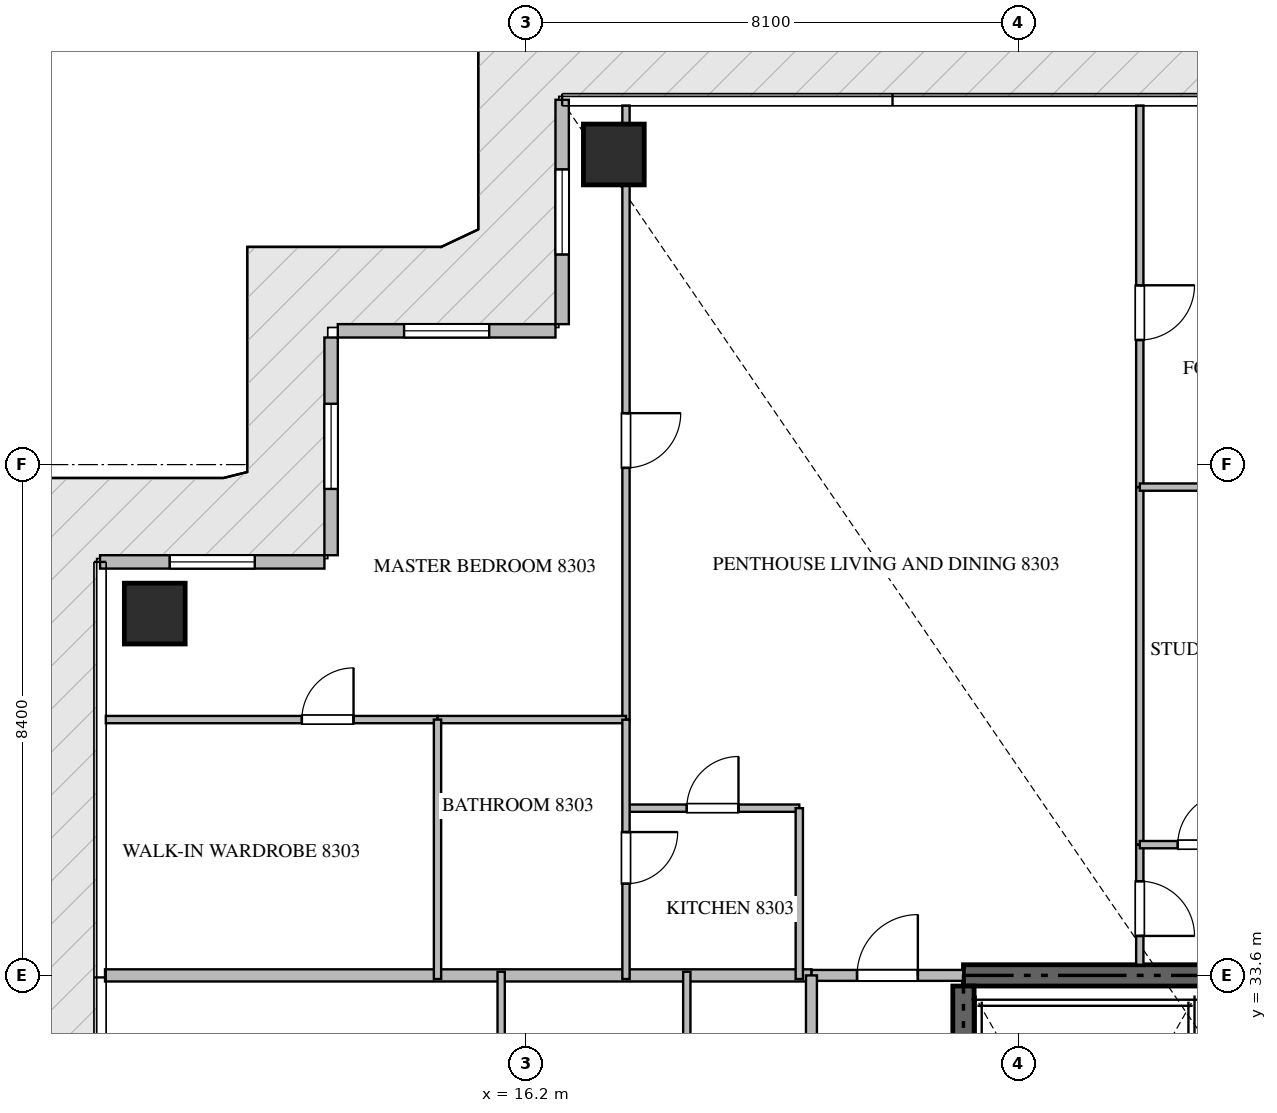
"""IFC4 building model, lengths in metres.
Left out: names, types, materials, properties, quantities, classifications, styles, units other than length and angle.
Written with IfcOpenShell. Run it as: python <this file> out.ifc"""

import sys

from ifc_helpers import new_model, si_unit, direction, frame, frame_2d, origin, origin_2d, place, context, subcontext, project, spatial, rectangle, extrude, source, transform, mapped, element, fill, save


model = new_model("IFC4")
c1 = context("Model", 3, precision=1e-05, world=origin(), true_north=direction((0.0, 1.0)))
c2 = subcontext(c1, "Body", "Model", "MODEL_VIEW")
j1 = project(units=[si_unit("LENGTHUNIT", "METRE"), si_unit("PLANEANGLEUNIT", "RADIAN")], contexts=[c1])
p1 = place(None, origin())
s1 = spatial("IfcSite", under=j1, at=p1, CompositionType="ELEMENT")
p2 = place(p1, origin())
s2 = spatial("IfcBuilding", under=s1, at=p2, CompositionType="ELEMENT")
p3 = place(p2, frame((0.0, 0.0, 333.95)))
s3 = spatial("IfcBuildingStorey", under=s2, at=p3, CompositionType="ELEMENT", Elevation=333.95)
p4 = place(p3, frame((41.4, 33.6, -0.26), z_axis=(0.0, 0.0, 1.0), x_axis=(-1.0, 0.0, 0.0)))
e1 = element("IfcWall", 1, at=p4, inside=s3, PredefinedType="SHEAR", context=c2, shape_type="SweptSolid", body=[
    extrude(rectangle(XDim=18.0, YDim=0.35, at=frame_2d((9.0, 0.0))), origin(), (0.0, 0.0, 1.0), 3.868),
])
p5 = place(p3, frame((23.4, 24.25, -0.26), z_axis=(0.0, 0.0, 1.0), x_axis=(0.0, 1.0, 0.0)))
e2 = element("IfcWall", 2, at=p5, inside=s3, PredefinedType="SHEAR", context=c2, shape_type="SweptSolid", body=[
    extrude(rectangle(XDim=9.175, YDim=0.35, at=frame_2d((4.587, 0.0))), origin(), (0.0, 0.0, 1.0), 3.868),
])
m1 = source(origin(), c2, "Body", "SweptSolid", [
    extrude(rectangle(XDim=1.0, YDim=1.0, at=origin_2d()), origin(), (0.0, 0.0, 1.0), 3.87),
])
for number, where, z_axis, x_axis in (
    (3, (17.65, 47.1, -0.26), (0.0, 0.0, 1.0), (1.0, 0.0, 0.0)),
    (4, (10.1, 39.55, -0.26), (0.0, 0.0, 1.0), (1.0, 0.0, 0.0)),
):
    element("IfcColumn", number, at=place(p3, frame(where, z_axis=z_axis, x_axis=x_axis)), inside=s3, PredefinedType="COLUMN", context=c2, shape_type="MappedRepresentation", body=[
        mapped(m1, transform((0.0, 0.0, 0.0), scale=1.0)),
    ])
p6 = place(p3, frame((16.8, 48.0, 0.0), z_axis=(0.0, 0.0, 1.0), x_axis=(0.0, -1.0, 0.0)))
e5 = element("IfcWall", 5, at=p6, inside=s3, PredefinedType="ELEMENTEDWALL", context=c2, shape_type="SweptSolid", body=[
    extrude(rectangle(XDim=3.69, YDim=0.22, at=frame_2d((1.845, 0.0))), origin(), (0.0, 0.0, 1.0), 3.595),
])
p7 = place(p6, frame((1.145, 0.0, 0.65)))
e6 = element("IfcOpeningElement", 6, at=p7, cuts=e5, PredefinedType="OPENING", context=c2, shape_type="SweptSolid", body=[
    extrude(rectangle(XDim=1.4, YDim=1.35, at=frame_2d((0.7, 0.675))), frame((0.0, 0.12, 0.0), z_axis=(0.0, -1.0, 0.0), x_axis=(1.0, 0.0, 0.0)), (0.0, 0.0, 1.0), 0.24),
])
p8 = place(p3, frame((16.69, 44.2, 0.0), z_axis=(0.0, 0.0, 1.0), x_axis=(-1.0, 0.0, 0.0)))
e7 = element("IfcWall", 7, at=p8, inside=s3, PredefinedType="ELEMENTEDWALL", context=c2, shape_type="SweptSolid", body=[
    extrude(rectangle(XDim=3.58, YDim=0.22, at=frame_2d((1.79, 0.0))), origin(), (0.0, 0.0, 1.0), 3.595),
])
p9 = place(p8, frame((1.09, 0.0, 0.65)))
e8 = element("IfcOpeningElement", 8, at=p9, cuts=e7, PredefinedType="OPENING", context=c2, shape_type="SweptSolid", body=[
    extrude(rectangle(XDim=1.4, YDim=1.35, at=frame_2d((0.7, 0.675))), frame((0.0, 0.12, 0.0), z_axis=(0.0, -1.0, 0.0), x_axis=(1.0, 0.0, 0.0)), (0.0, 0.0, 1.0), 0.24),
])
p10 = place(p3, frame((13.0, 44.09, 0.0), z_axis=(0.0, 0.0, 1.0), x_axis=(0.0, -1.0, 0.0)))
e9 = element("IfcWall", 9, at=p10, inside=s3, PredefinedType="ELEMENTEDWALL", context=c2, shape_type="SweptSolid", body=[
    extrude(rectangle(XDim=3.58, YDim=0.22, at=frame_2d((1.79, 0.0))), origin(), (0.0, 0.0, 1.0), 3.595),
])
p11 = place(p10, frame((1.09, 0.0, 0.65)))
e10 = element("IfcOpeningElement", 10, at=p11, cuts=e9, PredefinedType="OPENING", context=c2, shape_type="SweptSolid", body=[
    extrude(rectangle(XDim=1.4, YDim=1.35, at=frame_2d((0.7, 0.675))), frame((0.0, 0.12, 0.0), z_axis=(0.0, -1.0, 0.0), x_axis=(1.0, 0.0, 0.0)), (0.0, 0.0, 1.0), 0.24),
])
p12 = place(p3, frame((12.89, 40.4, 0.0), z_axis=(0.0, 0.0, 1.0), x_axis=(-1.0, 0.0, 0.0)))
e11 = element("IfcWall", 11, at=p12, inside=s3, PredefinedType="ELEMENTEDWALL", context=c2, shape_type="SweptSolid", body=[
    extrude(rectangle(XDim=3.69, YDim=0.22, at=frame_2d((1.845, 0.0))), origin(), (0.0, 0.0, 1.0), 3.595),
])
p13 = place(p12, frame((1.145, 0.0, 0.65)))
e12 = element("IfcOpeningElement", 12, at=p13, cuts=e11, PredefinedType="OPENING", context=c2, shape_type="SweptSolid", body=[
    extrude(rectangle(XDim=1.4, YDim=1.35, at=frame_2d((0.7, 0.675))), frame((0.0, 0.12, 0.0), z_axis=(0.0, -1.0, 0.0), x_axis=(1.0, 0.0, 0.0)), (0.0, 0.0, 1.0), 0.24),
])
p14 = place(p3, frame((9.282, 33.6, 0.0), z_axis=(0.0, 0.0, 1.0), x_axis=(1.0, 0.0, 0.0)))
e13 = element("IfcWall", 13, at=p14, inside=s3, PredefinedType="PARTITIONING", context=c2, shape_type="SweptSolid", body=[
    extrude(rectangle(XDim=11.618, YDim=0.2, at=frame_2d((5.809, 0.0))), origin(), (0.0, 0.0, 1.0), 3.61),
])
p15 = place(p3, frame((20.902, 33.6, 0.0), z_axis=(0.0, 0.0, 1.0), x_axis=(1.0, 0.0, 0.0)))
e14 = element("IfcWall", 14, at=p15, inside=s3, PredefinedType="PARTITIONING", context=c2, shape_type="SweptSolid", body=[
    extrude(rectangle(XDim=2.496, YDim=0.18, at=frame_2d((1.248, 0.0))), origin(), (0.0, 0.0, 1.0), 3.61),
])
p16 = place(p15, frame((0.748, 0.0, 0.0)))
e15 = element("IfcOpeningElement", 15, at=p16, cuts=e14, PredefinedType="OPENING", context=c2, shape_type="SweptSolid", body=[
    extrude(rectangle(XDim=1.0, YDim=2.15, at=frame_2d((0.5, 1.075))), frame((0.0, 0.1, 0.0), z_axis=(0.0, -1.0, 0.0), x_axis=(1.0, 0.0, 0.0)), (0.0, 0.0, 1.0), 0.2),
])
p17 = place(p3, frame((20.9, 16.8, 0.0), z_axis=(0.0, 0.0, 1.0), x_axis=(0.0, 1.0, 0.0)))
e16 = element("IfcWall", 16, at=p17, inside=s3, PredefinedType="PARTITIONING", context=c2, shape_type="SweptSolid", body=[
    extrude(rectangle(XDim=16.8, YDim=0.18, at=frame_2d((8.4, 0.0))), origin(), (0.0, 0.0, 1.0), 3.61),
])
p18 = place(p17, frame((4.503, 0.0, 0.0)))
e17 = element("IfcOpeningElement", 17, at=p18, cuts=e16, PredefinedType="OPENING", context=c2, shape_type="SweptSolid", body=[
    extrude(rectangle(XDim=1.0, YDim=2.15, at=frame_2d((0.5, 1.075))), frame((0.0, 0.1, 0.0), z_axis=(0.0, -1.0, 0.0), x_axis=(1.0, 0.0, 0.0)), (0.0, 0.0, 1.0), 0.2),
])
p19 = place(p17, frame((8.706, 0.0, 0.0)))
e18 = element("IfcOpeningElement", 18, at=p19, cuts=e16, PredefinedType="OPENING", context=c2, shape_type="SweptSolid", body=[
    extrude(rectangle(XDim=1.0, YDim=2.15, at=frame_2d((0.5, 1.075))), frame((0.0, 0.1, 0.0), z_axis=(0.0, -1.0, 0.0), x_axis=(1.0, 0.0, 0.0)), (0.0, 0.0, 1.0), 0.2),
])
p20 = place(p3, frame((17.85, 36.35, 0.0), z_axis=(0.0, 0.0, 1.0), x_axis=(1.0, 0.0, 0.0)))
e19 = element("IfcWall", 19, at=p20, inside=s3, PredefinedType="PARTITIONING", context=c2, shape_type="SweptSolid", body=[
    extrude(rectangle(XDim=2.85, YDim=0.12, at=frame_2d((1.425, 0.0))), origin(), (0.0, 0.0, 1.0), 3.332),
])
p21 = place(p20, frame((1.0, 0.0, 0.0)))
e20 = element("IfcOpeningElement", 20, at=p21, cuts=e19, PredefinedType="OPENING", context=c2, shape_type="SweptSolid", body=[
    extrude(rectangle(XDim=0.85, YDim=2.1, at=frame_2d((0.425, 1.05))), frame((0.0, 0.07, 0.0), z_axis=(0.0, -1.0, 0.0), x_axis=(1.0, 0.0, 0.0)), (0.0, 0.0, 1.0), 0.14),
])
p22 = place(p3, frame((20.7, 36.35, 0.0), z_axis=(0.0, 0.0, 1.0), x_axis=(0.0, -1.0, 0.0)))
e21 = element("IfcWall", 21, at=p22, inside=s3, PredefinedType="PARTITIONING", context=c2, shape_type="SweptSolid", body=[
    extrude(rectangle(XDim=2.81, YDim=0.12, at=frame_2d((1.405, 0.0))), origin(), (0.0, 0.0, 1.0), 3.61),
])
p23 = place(p3, frame((17.85, 47.905, 0.0), z_axis=(0.0, 0.0, 1.0), x_axis=(0.0, -1.0, 0.0)))
e22 = element("IfcWall", 22, at=p23, inside=s3, PredefinedType="PARTITIONING", context=c2, shape_type="SweptSolid", body=[
    extrude(rectangle(XDim=10.098, YDim=0.12, at=frame_2d((5.049, 0.0))), origin(), (0.0, 0.0, 1.0), 2.445),
])
p24 = place(p23, frame((5.059, 0.0, 0.0)))
e23 = element("IfcOpeningElement", 23, at=p24, cuts=e22, PredefinedType="OPENING", context=c2, shape_type="SweptSolid", body=[
    extrude(rectangle(XDim=0.9, YDim=2.1, at=frame_2d((0.45, 1.05))), frame((0.0, 0.07, 0.0), z_axis=(0.0, -1.0, 0.0), x_axis=(1.0, 0.0, 0.0)), (0.0, 0.0, 1.0), 0.14),
])
p25 = place(p3, frame((9.295, 37.807, 0.0), z_axis=(0.0, 0.0, 1.0), x_axis=(1.0, 0.0, 0.0)))
e24 = element("IfcWall", 24, at=p25, inside=s3, PredefinedType="PARTITIONING", context=c2, shape_type="SweptSolid", body=[
    extrude(rectangle(XDim=5.455, YDim=0.12, at=frame_2d((2.728, 0.0))), origin(), (0.0, 0.0, 1.0), 3.61),
])
p26 = place(p25, frame((3.224, 0.0, 0.0)))
e25 = element("IfcOpeningElement", 25, at=p26, cuts=e24, PredefinedType="OPENING", context=c2, shape_type="SweptSolid", body=[
    extrude(rectangle(XDim=0.85, YDim=2.1, at=frame_2d((0.425, 1.05))), frame((0.0, 0.07, 0.0), z_axis=(0.0, -1.0, 0.0), x_axis=(1.0, 0.0, 0.0)), (0.0, 0.0, 1.0), 0.14),
])
p27 = place(p3, frame((14.752, 37.807, 0.0), z_axis=(0.0, 0.0, 1.0), x_axis=(1.0, 0.0, 0.0)))
e26 = element("IfcWall", 26, at=p27, inside=s3, PredefinedType="PARTITIONING", context=c2, shape_type="SweptSolid", body=[
    extrude(rectangle(XDim=3.098, YDim=0.12, at=frame_2d((1.549, 0.0))), origin(), (0.0, 0.0, 1.0), 3.61),
])
p28 = place(p3, frame((14.75, 37.807, 0.0), z_axis=(0.0, 0.0, 1.0), x_axis=(0.0, -1.0, 0.0)))
e27 = element("IfcWall", 27, at=p28, inside=s3, PredefinedType="PARTITIONING", context=c2, shape_type="SweptSolid", body=[
    extrude(rectangle(XDim=4.267, YDim=0.12, at=frame_2d((2.133, 0.0))), origin(), (0.0, 0.0, 1.0), 3.61),
])
p29 = place(p3, frame((17.85, 37.805, 0.0), z_axis=(0.0, 0.0, 1.0), x_axis=(0.0, -1.0, 0.0)))
e28 = element("IfcWall", 28, at=p29, inside=s3, PredefinedType="PARTITIONING", context=c2, shape_type="SweptSolid", body=[
    extrude(rectangle(XDim=4.265, YDim=0.12, at=frame_2d((2.132, 0.0))), origin(), (0.0, 0.0, 1.0), 2.445),
])
p30 = place(p29, frame((1.848, 0.0, 0.0)))
e29 = element("IfcOpeningElement", 29, at=p30, cuts=e28, PredefinedType="OPENING", context=c2, shape_type="SweptSolid", body=[
    extrude(rectangle(XDim=0.85, YDim=2.1, at=frame_2d((0.425, 1.05))), frame((0.0, 0.07, 0.0), z_axis=(0.0, -1.0, 0.0), x_axis=(1.0, 0.0, 0.0)), (0.0, 0.0, 1.0), 0.14),
])
p31 = place(p3, frame((26.3, 35.75, 0.0), z_axis=(0.0, 0.0, 1.0), x_axis=(0.0, -1.0, 0.0)))
e30 = element("IfcWall", 30, at=p31, inside=s3, PredefinedType="PARTITIONING", context=c2, shape_type="SweptSolid", body=[
    extrude(rectangle(XDim=1.975, YDim=0.12, at=frame_2d((0.988, 0.0))), origin(), (0.0, 0.0, 1.0), 3.61),
])
p32 = place(p31, frame((0.601, 0.0, 0.0)))
e31 = element("IfcOpeningElement", 31, at=p32, cuts=e30, PredefinedType="OPENING", context=c2, shape_type="SweptSolid", body=[
    extrude(rectangle(XDim=0.9, YDim=2.1, at=frame_2d((0.45, 1.05))), frame((0.0, 0.07, 0.0), z_axis=(0.0, -1.0, 0.0), x_axis=(1.0, 0.0, 0.0)), (0.0, 0.0, 1.0), 0.14),
])
p33 = place(p3, frame((26.3, 47.905, 0.0), z_axis=(0.0, 0.0, 1.0), x_axis=(0.0, -1.0, 0.0)))
e32 = element("IfcWall", 32, at=p33, inside=s3, PredefinedType="PARTITIONING", context=c2, shape_type="SweptSolid", body=[
    extrude(rectangle(XDim=6.275, YDim=0.12, at=frame_2d((3.138, 0.0))), origin(), (0.0, 0.0, 1.0), 3.61),
])
p34 = place(p33, frame((2.956, 0.0, 0.0)))
e33 = element("IfcOpeningElement", 33, at=p34, cuts=e32, PredefinedType="OPENING", context=c2, shape_type="SweptSolid", body=[
    extrude(rectangle(XDim=0.9, YDim=2.1, at=frame_2d((0.45, 1.05))), frame((0.0, 0.07, 0.0), z_axis=(0.0, -1.0, 0.0), x_axis=(1.0, 0.0, 0.0)), (0.0, 0.0, 1.0), 0.14),
])
p35 = place(p3, frame((26.3, 41.628, 0.0), z_axis=(0.0, 0.0, 1.0), x_axis=(0.0, -1.0, 0.0)))
e34 = element("IfcWall", 34, at=p35, inside=s3, PredefinedType="PARTITIONING", context=c2, shape_type="SweptSolid", body=[
    extrude(rectangle(XDim=5.876, YDim=0.12, at=frame_2d((2.938, 0.0))), origin(), (0.0, 0.0, 1.0), 3.61),
])
p36 = place(p3, frame((26.3, 41.63, 0.0), z_axis=(0.0, 0.0, 1.0), x_axis=(1.0, 0.0, 0.0)))
e35 = element("IfcWall", 35, at=p36, inside=s3, PredefinedType="PARTITIONING", context=c2, shape_type="SweptSolid", body=[
    extrude(rectangle(XDim=5.15, YDim=0.12, at=frame_2d((2.575, 0.0))), origin(), (0.0, 0.0, 1.0), 3.61),
])
p37 = place(p3, frame((26.3, 35.75, 0.0), z_axis=(0.0, 0.0, 1.0), x_axis=(1.0, 0.0, 0.0)))
e36 = element("IfcWall", 36, at=p37, inside=s3, PredefinedType="PARTITIONING", context=c2, shape_type="SweptSolid", body=[
    extrude(rectangle(XDim=2.1, YDim=0.12, at=frame_2d((1.05, 0.0))), origin(), (0.0, 0.0, 1.0), 3.61),
])
p38 = place(p37, frame((0.625, 0.0, 0.0)))
e37 = element("IfcOpeningElement", 37, at=p38, cuts=e36, PredefinedType="OPENING", context=c2, shape_type="SweptSolid", body=[
    extrude(rectangle(XDim=0.85, YDim=2.1, at=frame_2d((0.425, 1.05))), frame((0.0, 0.07, 0.0), z_axis=(0.0, -1.0, 0.0), x_axis=(1.0, 0.0, 0.0)), (0.0, 0.0, 1.0), 0.14),
])
for number, where, z_axis, x_axis in (
    (38, (15.797, 27.8, 0.0), (0.0, 0.0, 1.0), (0.0, 1.0, 0.0)),
    (39, (18.85, 27.8, 0.0), (0.0, 0.0, 1.0), (0.0, 1.0, 0.0)),
):
    element("IfcWall", number, at=place(p3, frame(where, z_axis=z_axis, x_axis=x_axis)), inside=s3, PredefinedType="PARTITIONING", context=c2, shape_type="SweptSolid", body=[
        extrude(rectangle(XDim=5.86, YDim=0.12, at=frame_2d((2.93, 0.0))), origin(), (0.0, 0.0, 1.0), 3.61),
    ])
m2 = source(origin(), c2, "Body", "SweptSolid", [
    extrude(rectangle(XDim=1.4, YDim=1.35, at=frame_2d((0.7, 0.675))), frame((0.0, 0.03, 0.0), z_axis=(0.0, -1.0, 0.0), x_axis=(1.0, 0.0, 0.0)), (0.0, 0.0, 1.0), 0.06),
])
p39 = place(p7, origin())
e40 = element("IfcWindow", 40, at=p39, inside=s3, PartitioningType="SINGLE_PANEL", PredefinedType="WINDOW", context=c2, shape_type="MappedRepresentation", body=[
    mapped(m2, transform((0.0, 0.0, 0.0), scale=1.0)),
])
fill(e6, e40)
p40 = place(p9, origin())
e41 = element("IfcWindow", 41, at=p40, inside=s3, PartitioningType="SINGLE_PANEL", PredefinedType="WINDOW", context=c2, shape_type="MappedRepresentation", body=[
    mapped(m2, transform((0.0, 0.0, 0.0), scale=1.0)),
])
fill(e8, e41)
p41 = place(p11, origin())
e42 = element("IfcWindow", 42, at=p41, inside=s3, PartitioningType="SINGLE_PANEL", PredefinedType="WINDOW", context=c2, shape_type="MappedRepresentation", body=[
    mapped(m2, transform((0.0, 0.0, 0.0), scale=1.0)),
])
fill(e10, e42)
p42 = place(p13, origin())
e43 = element("IfcWindow", 43, at=p42, inside=s3, PartitioningType="SINGLE_PANEL", PredefinedType="WINDOW", context=c2, shape_type="MappedRepresentation", body=[
    mapped(m2, transform((0.0, 0.0, 0.0), scale=1.0)),
])
fill(e12, e43)
m3 = source(origin(), c2, "Body", "SweptSolid", [
    extrude(rectangle(XDim=1.0, YDim=2.15, at=frame_2d((0.5, 1.075))), frame((0.0, 0.025, 0.0), z_axis=(0.0, -1.0, 0.0), x_axis=(1.0, 0.0, 0.0)), (0.0, 0.0, 1.0), 0.05),
])
p43 = place(p16, origin())
e44 = element("IfcDoor", 44, at=p43, inside=s3, OperationType="SINGLE_SWING_RIGHT", PredefinedType="DOOR", context=c2, shape_type="MappedRepresentation", body=[
    mapped(m3, transform((0.0, 0.0, 0.0), scale=1.0)),
])
fill(e15, e44)
m4 = source(origin(), c2, "Body", "SweptSolid", [
    extrude(rectangle(XDim=0.85, YDim=2.1, at=frame_2d((0.425, 1.05))), frame((0.0, 0.025, 0.0), z_axis=(0.0, -1.0, 0.0), x_axis=(1.0, 0.0, 0.0)), (0.0, 0.0, 1.0), 0.05),
])
p44 = place(p21, origin())
e45 = element("IfcDoor", 45, at=p44, inside=s3, OperationType="SINGLE_SWING_RIGHT", PredefinedType="DOOR", context=c2, shape_type="MappedRepresentation", body=[
    mapped(m4, transform((0.0, 0.0, 0.0), scale=1.0)),
])
fill(e20, e45)
m5 = source(origin(), c2, "Body", "SweptSolid", [
    extrude(rectangle(XDim=0.9, YDim=2.1, at=frame_2d((0.45, 1.05))), frame((0.0, 0.025, 0.0), z_axis=(0.0, -1.0, 0.0), x_axis=(1.0, 0.0, 0.0)), (0.0, 0.0, 1.0), 0.05),
])
p45 = place(p24, origin())
e46 = element("IfcDoor", 46, at=p45, inside=s3, OperationType="SINGLE_SWING_LEFT", PredefinedType="DOOR", context=c2, shape_type="MappedRepresentation", body=[
    mapped(m5, transform((0.0, 0.0, 0.0), scale=1.0)),
])
fill(e23, e46)
p46 = place(p26, origin())
e47 = element("IfcDoor", 47, at=p46, inside=s3, OperationType="SINGLE_SWING_RIGHT", PredefinedType="DOOR", context=c2, shape_type="MappedRepresentation", body=[
    mapped(m4, transform((0.0, 0.0, 0.0), scale=1.0)),
])
fill(e25, e47)
p47 = place(p30, origin())
e48 = element("IfcDoor", 48, at=p47, inside=s3, OperationType="SINGLE_SWING_LEFT", PredefinedType="DOOR", context=c2, shape_type="MappedRepresentation", body=[
    mapped(m4, transform((0.0, 0.0, 0.0), scale=1.0)),
])
fill(e29, e48)
p48 = place(p32, origin())
e49 = element("IfcDoor", 49, at=p48, inside=s3, OperationType="SINGLE_SWING_RIGHT", PredefinedType="DOOR", context=c2, shape_type="MappedRepresentation", body=[
    mapped(m5, transform((0.0, 0.0, 0.0), scale=1.0)),
])
fill(e31, e49)
p49 = place(p34, origin())
e50 = element("IfcDoor", 50, at=p49, inside=s3, OperationType="SINGLE_SWING_LEFT", PredefinedType="DOOR", context=c2, shape_type="MappedRepresentation", body=[
    mapped(m5, transform((0.0, 0.0, 0.0), scale=1.0)),
])
fill(e33, e50)
p50 = place(p38, origin())
e51 = element("IfcDoor", 51, at=p50, inside=s3, OperationType="SINGLE_SWING_RIGHT", PredefinedType="DOOR", context=c2, shape_type="MappedRepresentation", body=[
    mapped(m4, transform((0.0, 0.0, 0.0), scale=1.0)),
])
fill(e37, e51)
save(model, sys.argv[1])
